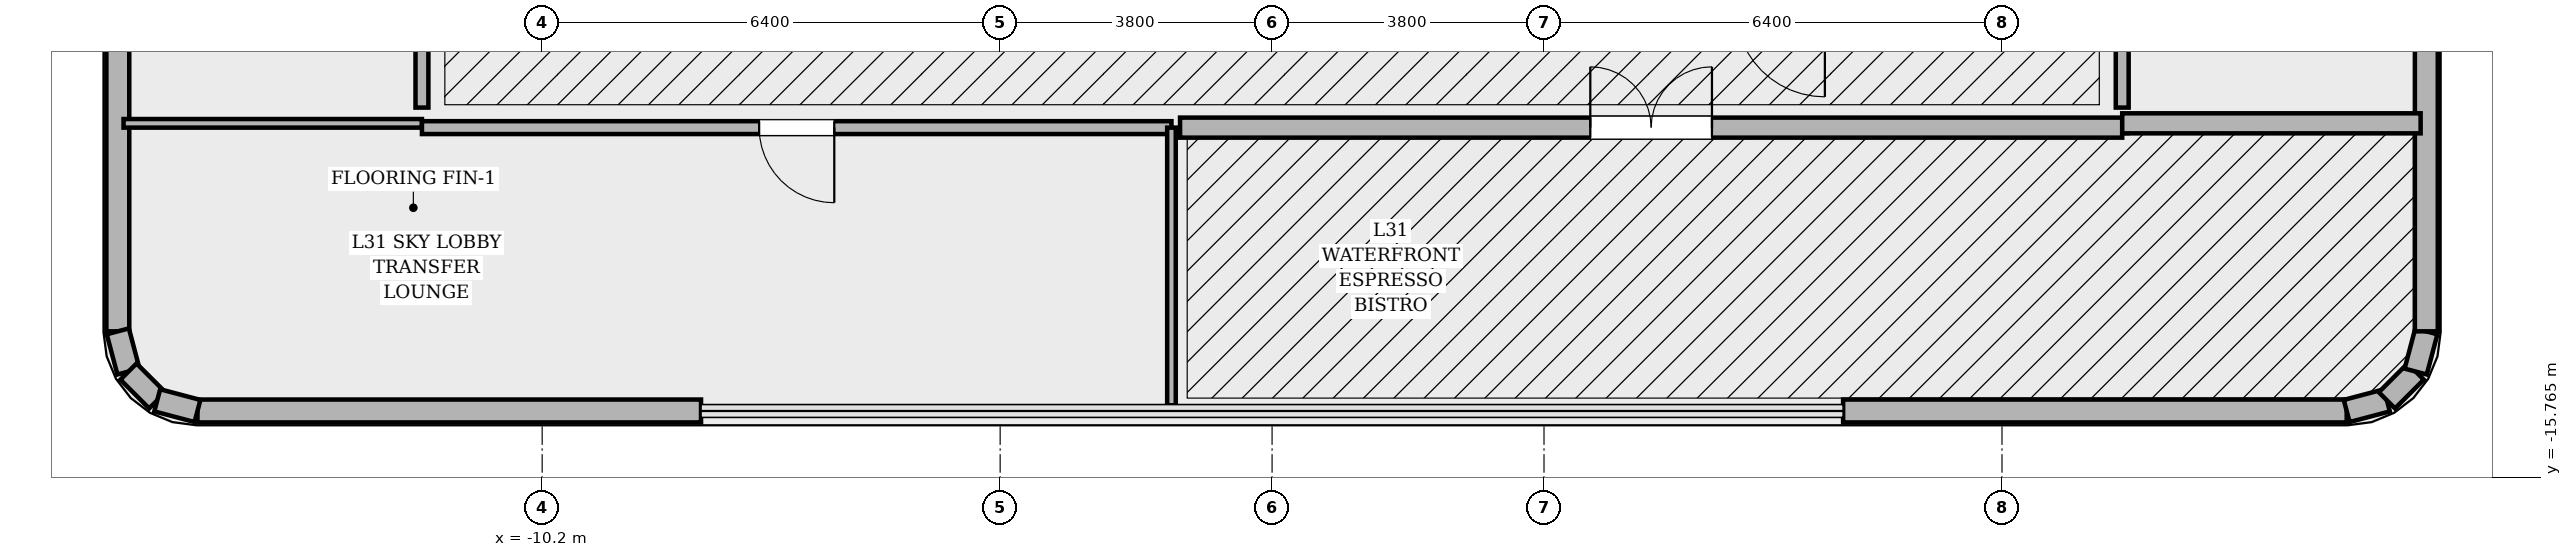
"""IFC4 building model, lengths in metres.
Left out: names, types, materials, properties, quantities, classifications, styles, units other than length and angle.
Written with IfcOpenShell. Run it as: python <this file> out.ifc"""

import sys

from ifc_helpers import new_model, si_unit, direction, frame, frame_2d, origin, place, context, subcontext, project, spatial, rectangle, extrude, element, fill, save


model = new_model("IFC4")
c1 = context("Model", 3, precision=1e-05, world=origin(), true_north=direction((0.0, 1.0)))
c2 = subcontext(c1, "Body", "Model", "MODEL_VIEW")
j1 = project(units=[si_unit("LENGTHUNIT", "METRE"), si_unit("PLANEANGLEUNIT", "RADIAN")], contexts=[c1])
p1 = place(None, origin())
s1 = spatial("IfcSite", under=j1, at=p1, CompositionType="ELEMENT")
p2 = place(p1, origin())
s2 = spatial("IfcBuilding", under=s1, at=p2, CompositionType="ELEMENT")
p3 = place(p2, frame((0.0, 0.0, 135.0)))
s3 = spatial("IfcBuildingStorey", under=s2, at=p3, CompositionType="ELEMENT", Elevation=135.0)
for number, where, z_axis, x_axis in (
    (1, (-15.017, -14.84, 0.0), (0.0, 0.0, 1.0), (1.0, 0.0, 0.0)),
    (2, (7.98, -14.84, 0.0), (0.0, 0.0, 1.0), (1.0, 0.0, 0.0)),
):
    element("IfcWall", number, at=place(p3, frame(where, z_axis=z_axis, x_axis=x_axis)), inside=s3, PredefinedType="SOLIDWALL", context=c2, shape_type="SweptSolid", body=[
        extrude(rectangle(XDim=7.037, YDim=0.32, at=frame_2d((3.519, 0.0))), origin(), (0.0, 0.0, 1.0), 3.194),
    ])
p4 = place(p3, frame((15.017, -14.84, 0.0), z_axis=(0.0, 0.0, 1.0), x_axis=(0.966665515501, 0.256042537758, 0.0)))
e3 = element("IfcWall", 3, at=p4, inside=s3, PredefinedType="SOLIDWALL", context=c2, shape_type="SweptSolid", body=[
    extrude(rectangle(XDim=0.582, YDim=0.32, at=frame_2d((0.291, 0.0))), origin(), (0.0, 0.0, 1.0), 4.52),
])
p5 = place(p3, frame((15.579, -14.691, 0.0), z_axis=(0.0, 0.0, 1.0), x_axis=(0.707106781187, 0.707106781187, 0.0)))
e4 = element("IfcWall", 4, at=p5, inside=s3, PredefinedType="SOLIDWALL", context=c2, shape_type="SweptSolid", body=[
    extrude(rectangle(XDim=0.569, YDim=0.32, at=frame_2d((0.284, 0.0))), origin(), (0.0, 0.0, 1.0), 4.52),
])
p6 = place(p3, frame((15.981, -14.289, 0.0), z_axis=(0.0, 0.0, 1.0), x_axis=(0.255650250031, 0.966769336325, 0.0)))
e5 = element("IfcWall", 5, at=p6, inside=s3, PredefinedType="SOLIDWALL", context=c2, shape_type="SweptSolid", body=[
    extrude(rectangle(XDim=0.582, YDim=0.32, at=frame_2d((0.291, 0.0))), origin(), (0.0, 0.0, 1.0), 4.52),
])
for number, where, z_axis, x_axis in (
    (6, (16.13, -13.727, 0.0), (0.0, 0.0, 1.0), (0.0, 1.0, 0.0)),
    (7, (-16.13, -6.69, 0.0), (0.0, 0.0, 1.0), (0.0, -1.0, 0.0)),
):
    element("IfcWall", number, at=place(p3, frame(where, z_axis=z_axis, x_axis=x_axis)), inside=s3, PredefinedType="SOLIDWALL", context=c2, shape_type="SweptSolid", body=[
        extrude(rectangle(XDim=7.037, YDim=0.32, at=frame_2d((3.519, 0.0))), origin(), (0.0, 0.0, 1.0), 3.194),
    ])
p7 = place(p3, frame((-16.13, -13.727, 0.0), z_axis=(0.0, 0.0, 1.0), x_axis=(0.255650250031, -0.966769336325, 0.0)))
e8 = element("IfcWall", 8, at=p7, inside=s3, PredefinedType="SOLIDWALL", context=c2, shape_type="SweptSolid", body=[
    extrude(rectangle(XDim=0.582, YDim=0.32, at=frame_2d((0.291, 0.0))), origin(), (0.0, 0.0, 1.0), 4.52),
])
p8 = place(p3, frame((-15.981, -14.289, 0.0), z_axis=(0.0, 0.0, 1.0), x_axis=(0.707106781187, -0.707106781187, 0.0)))
e9 = element("IfcWall", 9, at=p8, inside=s3, PredefinedType="SOLIDWALL", context=c2, shape_type="SweptSolid", body=[
    extrude(rectangle(XDim=0.569, YDim=0.32, at=frame_2d((0.284, 0.0))), origin(), (0.0, 0.0, 1.0), 4.52),
])
p9 = place(p3, frame((-15.579, -14.691, 0.0), z_axis=(0.0, 0.0, 1.0), x_axis=(0.966665515501, -0.256042537758, 0.0)))
e10 = element("IfcWall", 10, at=p9, inside=s3, PredefinedType="SOLIDWALL", context=c2, shape_type="SweptSolid", body=[
    extrude(rectangle(XDim=0.582, YDim=0.32, at=frame_2d((0.291, 0.0))), origin(), (0.0, 0.0, 1.0), 4.52),
])
p10 = place(p3, frame((-16.05, -10.82, 0.0), z_axis=(0.0, 0.0, 1.0), x_axis=(1.0, 0.0, 0.0)))
e11 = element("IfcWall", 11, at=p10, inside=s3, PredefinedType="PARTITIONING", context=c2, shape_type="SweptSolid", body=[
    extrude(rectangle(XDim=4.17, YDim=0.12, at=frame_2d((2.085, 0.0))), origin(), (0.0, 0.0, 1.0), 4.114),
])
p11 = place(p3, frame((-11.88, -10.88, 0.0), z_axis=(0.0, 0.0, 1.0), x_axis=(1.0, 0.0, 0.0)))
e12 = element("IfcWall", 12, at=p11, inside=s3, PredefinedType="PARTITIONING", context=c2, shape_type="SweptSolid", body=[
    extrude(rectangle(XDim=10.474, YDim=0.18, at=frame_2d((5.237, 0.0))), origin(), (0.0, 0.0, 1.0), 3.194),
])
p12 = place(p11, frame((4.712, 0.0, 0.0)))
e13 = element("IfcOpeningElement", 13, at=p12, cuts=e12, PredefinedType="OPENING", context=c2, shape_type="SweptSolid", body=[
    extrude(rectangle(XDim=1.05, YDim=2.2, at=frame_2d((0.525, 1.1))), frame((0.0, 0.1, 0.0), z_axis=(0.0, -1.0, 0.0), x_axis=(1.0, 0.0, 0.0)), (0.0, 0.0, 1.0), 0.2),
])
p13 = place(p3, frame((-1.406, -10.88, 0.0), z_axis=(0.0, 0.0, 1.0), x_axis=(0.0, -1.0, 0.0)))
e14 = element("IfcWall", 14, at=p13, inside=s3, PredefinedType="PARTITIONING", context=c2, shape_type="SweptSolid", body=[
    extrude(rectangle(XDim=3.88, YDim=0.12, at=frame_2d((1.94, 0.0))), origin(), (0.0, 0.0, 1.0), 4.52),
])
p14 = place(p3, frame((-1.286, -10.88, 0.0), z_axis=(0.0, 0.0, 1.0), x_axis=(1.0, 0.0, 0.0)))
e15 = element("IfcWall", 15, at=p14, inside=s3, PredefinedType="SOLIDWALL", context=c2, shape_type="SweptSolid", body=[
    extrude(rectangle(XDim=13.166, YDim=0.28, at=frame_2d((6.583, 0.0))), origin(), (0.0, 0.0, 1.0), 3.194),
])
p15 = place(p14, frame((5.733, 0.0, 0.0)))
e16 = element("IfcOpeningElement", 16, at=p15, cuts=e15, PredefinedType="OPENING", context=c2, shape_type="SweptSolid", body=[
    extrude(rectangle(XDim=1.7, YDim=2.3, at=frame_2d((0.85, 1.15))), frame((0.0, 0.15, 0.0), z_axis=(0.0, -1.0, 0.0), x_axis=(1.0, 0.0, 0.0)), (0.0, 0.0, 1.0), 0.3),
])
p16 = place(p3, frame((11.88, -10.82, 0.0), z_axis=(0.0, 0.0, 1.0), x_axis=(1.0, 0.0, 0.0)))
e17 = element("IfcWall", 17, at=p16, inside=s3, PredefinedType="SOLIDWALL", context=c2, shape_type="SweptSolid", body=[
    extrude(rectangle(XDim=4.17, YDim=0.28, at=frame_2d((2.085, 0.0))), origin(), (0.0, 0.0, 1.0), 4.114),
])
p17 = place(p3, frame((-11.88, -0.06, 0.0), z_axis=(0.0, 0.0, 1.0), x_axis=(0.0, -1.0, 0.0)))
e18 = element("IfcWall", 18, at=p17, inside=s3, PredefinedType="PARTITIONING", context=c2, shape_type="SweptSolid", body=[
    extrude(rectangle(XDim=10.54, YDim=0.18, at=frame_2d((5.27, 0.0))), origin(), (0.0, 0.0, 1.0), 3.194),
])
p18 = place(p17, frame((4.76, 0.0, 0.0)))
e19 = element("IfcOpeningElement", 19, at=p18, cuts=e18, PredefinedType="OPENING", context=c2, shape_type="SweptSolid", body=[
    extrude(rectangle(XDim=1.02, YDim=2.2, at=frame_2d((0.51, 1.1))), frame((0.0, 0.1, 0.0), z_axis=(0.0, -1.0, 0.0), x_axis=(1.0, 0.0, 0.0)), (0.0, 0.0, 1.0), 0.2),
])
p19 = place(p3, frame((11.88, -10.6, 0.0), z_axis=(0.0, 0.0, 1.0), x_axis=(0.0, 1.0, 0.0)))
e20 = element("IfcWall", 20, at=p19, inside=s3, PredefinedType="PARTITIONING", context=c2, shape_type="SweptSolid", body=[
    extrude(rectangle(XDim=10.54, YDim=0.18, at=frame_2d((5.27, 0.0))), origin(), (0.0, 0.0, 1.0), 3.194),
])
p20 = place(p19, frame((4.745, 0.0, 0.0)))
e21 = element("IfcOpeningElement", 21, at=p20, cuts=e20, PredefinedType="OPENING", context=c2, shape_type="SweptSolid", body=[
    extrude(rectangle(XDim=1.05, YDim=2.2, at=frame_2d((0.525, 1.1))), frame((0.0, 0.1, 0.0), z_axis=(0.0, -1.0, 0.0), x_axis=(1.0, 0.0, 0.0)), (0.0, 0.0, 1.0), 0.2),
])
p21 = place(p12, origin())
e22 = element("IfcDoor", 22, at=p21, inside=s3, OperationType="SINGLE_SWING_RIGHT", PredefinedType="DOOR", context=c2, shape_type="SweptSolid", body=[
    extrude(rectangle(XDim=1.05, YDim=2.2, at=frame_2d((0.525, 1.1))), frame((0.0, 0.025, 0.0), z_axis=(0.0, -1.0, 0.0), x_axis=(1.0, 0.0, 0.0)), (0.0, 0.0, 1.0), 0.05),
])
fill(e13, e22)
p22 = place(p15, origin())
e23 = element("IfcDoor", 23, at=p22, inside=s3, OperationType="DOUBLE_DOOR_SINGLE_SWING", PredefinedType="DOOR", context=c2, shape_type="SweptSolid", body=[
    extrude(rectangle(XDim=1.7, YDim=2.3, at=frame_2d((0.85, 1.15))), frame((0.0, 0.025, 0.0), z_axis=(0.0, -1.0, 0.0), x_axis=(1.0, 0.0, 0.0)), (0.0, 0.0, 1.0), 0.05),
])
fill(e16, e23)
save(model, sys.argv[1])
